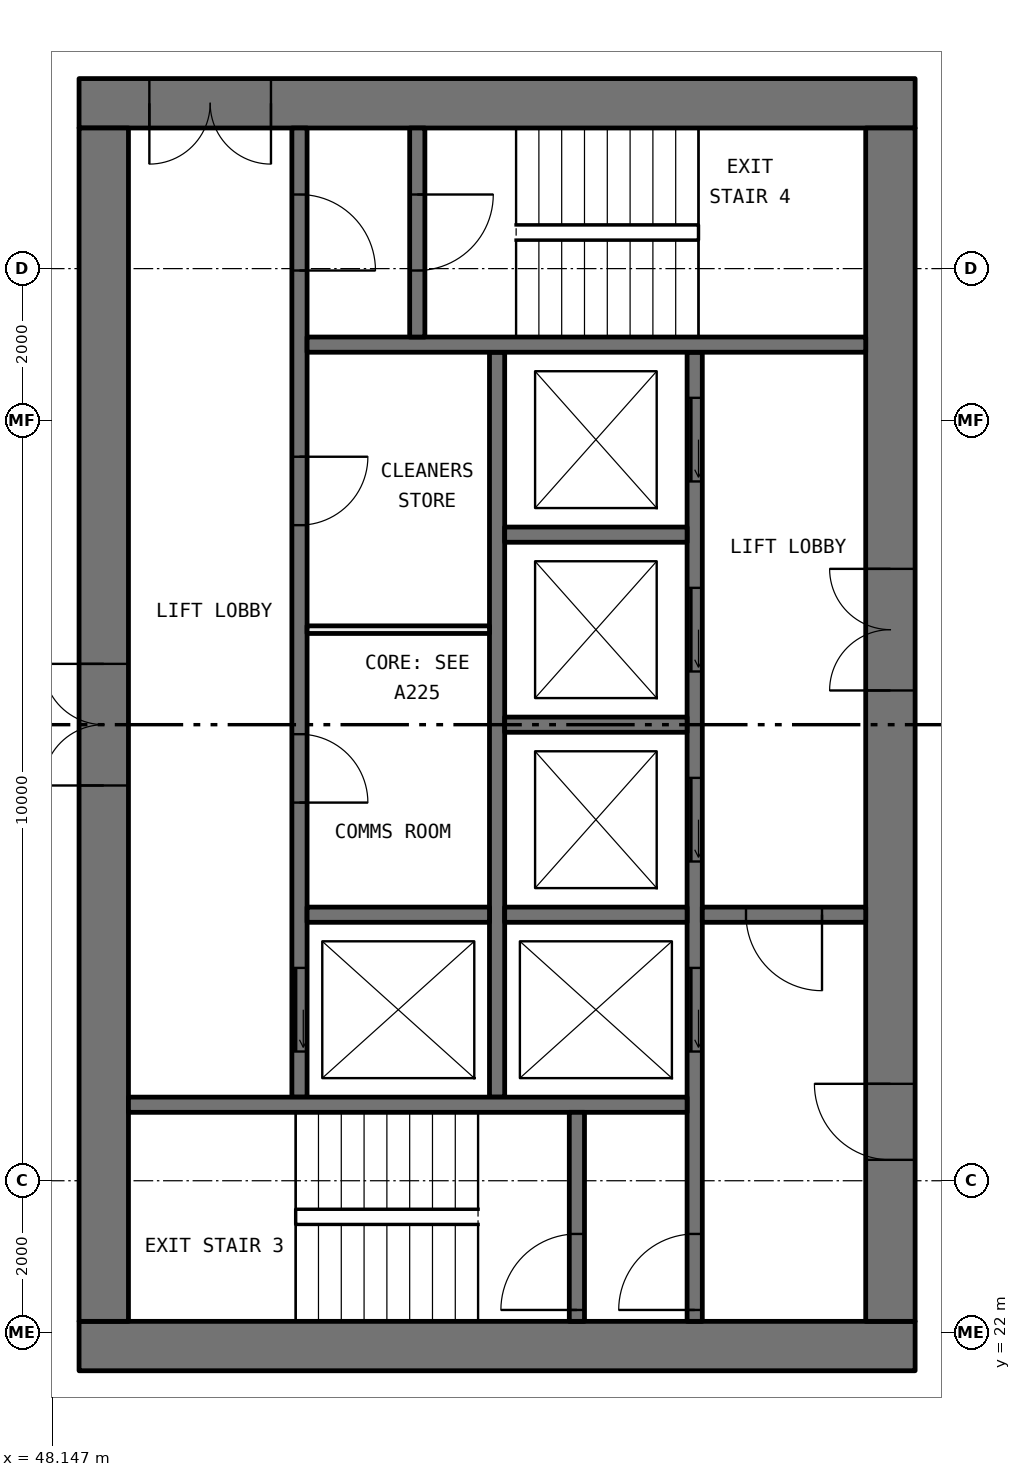
"""IFC4 building model, lengths in metres.
Left out: names, types, materials, properties, quantities, classifications, styles, units other than length and angle.
Written with IfcOpenShell. Run it as: python <this file> out.ifc"""

import sys

from ifc_helpers import new_model, si_unit, direction, frame, frame_2d, origin, place, context, subcontext, project, spatial, rectangle, extrude, element, fill, save


model = new_model("IFC4")
c1 = context("Model", 3, precision=1e-05, world=origin(), true_north=direction((0.0, 1.0)))
c2 = subcontext(c1, "Body", "Model", "MODEL_VIEW")
j1 = project(units=[si_unit("LENGTHUNIT", "METRE"), si_unit("PLANEANGLEUNIT", "RADIAN")], contexts=[c1])
p1 = place(None, origin())
s1 = spatial("IfcSite", under=j1, at=p1, CompositionType="ELEMENT")
p2 = place(p1, origin())
s2 = spatial("IfcBuilding", under=s1, at=p2, CompositionType="ELEMENT")
p3 = place(p2, frame((0.0, 0.0, 96.6)))
s3 = spatial("IfcBuildingStorey", under=s2, at=p3, CompositionType="ELEMENT", Elevation=96.6)
p4 = place(p3, frame((59.5, 21.825, 0.0), z_axis=(0.0, 0.0, 1.0), x_axis=(-1.0, 0.0, 0.0)))
e1 = element("IfcWall", 1, at=p4, inside=s3, PredefinedType="SHEAR", context=c2, shape_type="SweptSolid", body=[
    extrude(rectangle(XDim=11.0, YDim=0.65, at=frame_2d((5.5, 0.0))), origin(), (0.0, 0.0, 1.0), 3.05),
])
p5 = place(p3, frame((59.5, 38.175, 0.0), z_axis=(0.0, 0.0, 1.0), x_axis=(-1.0, 0.0, 0.0)))
e2 = element("IfcWall", 2, at=p5, inside=s3, PredefinedType="SHEAR", context=c2, shape_type="SweptSolid", body=[
    extrude(rectangle(XDim=11.0, YDim=0.65, at=frame_2d((5.5, 0.0))), origin(), (0.0, 0.0, 1.0), 3.05),
])
p6 = place(p5, frame((8.475, 0.0, 0.0)))
e3 = element("IfcOpeningElement", 3, at=p6, cuts=e2, PredefinedType="OPENING", context=c2, shape_type="SweptSolid", body=[
    extrude(rectangle(XDim=1.6, YDim=2.1, at=frame_2d((0.8, 1.05))), frame((0.0, 0.335, 0.0), z_axis=(0.0, -1.0, 0.0), x_axis=(1.0, 0.0, 0.0)), (0.0, 0.0, 1.0), 0.67),
])
p7 = place(p3, frame((59.175, 22.15, 0.0), z_axis=(0.0, 0.0, 1.0), x_axis=(0.0, 1.0, 0.0)))
e4 = element("IfcWall", 4, at=p7, inside=s3, PredefinedType="SHEAR", context=c2, shape_type="SweptSolid", body=[
    extrude(rectangle(XDim=15.7, YDim=0.65, at=frame_2d((7.85, 0.0))), origin(), (0.0, 0.0, 1.0), 3.05),
])
p8 = place(p7, frame((8.3, 0.0, 0.0)))
e5 = element("IfcOpeningElement", 5, at=p8, cuts=e4, PredefinedType="OPENING", context=c2, shape_type="SweptSolid", body=[
    extrude(rectangle(XDim=1.6, YDim=2.1, at=frame_2d((0.8, 1.05))), frame((0.0, 0.335, 0.0), z_axis=(0.0, -1.0, 0.0), x_axis=(1.0, 0.0, 0.0)), (0.0, 0.0, 1.0), 0.67),
])
p9 = place(p7, frame((2.125, 0.0, 0.0)))
e6 = element("IfcOpeningElement", 6, at=p9, cuts=e4, PredefinedType="OPENING", context=c2, shape_type="SweptSolid", body=[
    extrude(rectangle(XDim=1.0, YDim=2.1, at=frame_2d((0.5, 1.05))), frame((0.0, 0.335, 0.0), z_axis=(0.0, -1.0, 0.0), x_axis=(1.0, 0.0, 0.0)), (0.0, 0.0, 1.0), 0.67),
])
p10 = place(p3, frame((48.825, 22.15, 0.0), z_axis=(0.0, 0.0, 1.0), x_axis=(0.0, 1.0, 0.0)))
e7 = element("IfcWall", 7, at=p10, inside=s3, PredefinedType="SHEAR", context=c2, shape_type="SweptSolid", body=[
    extrude(rectangle(XDim=15.7, YDim=0.65, at=frame_2d((7.85, 0.0))), origin(), (0.0, 0.0, 1.0), 3.05),
])
p11 = place(p10, frame((7.05, 0.0, 0.0)))
e8 = element("IfcOpeningElement", 8, at=p11, cuts=e7, PredefinedType="OPENING", context=c2, shape_type="SweptSolid", body=[
    extrude(rectangle(XDim=1.6, YDim=2.1, at=frame_2d((0.8, 1.05))), frame((0.0, 0.335, 0.0), z_axis=(0.0, -1.0, 0.0), x_axis=(1.0, 0.0, 0.0)), (0.0, 0.0, 1.0), 0.67),
])
p12 = place(p3, frame((56.6, 22.15, 0.0), z_axis=(0.0, 0.0, 1.0), x_axis=(0.0, 1.0, 0.0)))
e9 = element("IfcWall", 9, at=p12, inside=s3, PredefinedType="SOLIDWALL", context=c2, shape_type="SweptSolid", body=[
    extrude(rectangle(XDim=12.75, YDim=0.2, at=frame_2d((6.375, 0.0))), origin(), (0.0, 0.0, 1.0), 3.05),
])
p13 = place(p12, frame((3.55, 0.0, 0.0)))
e10 = element("IfcOpeningElement", 10, at=p13, cuts=e9, PredefinedType="OPENING", context=c2, shape_type="SweptSolid", body=[
    extrude(rectangle(XDim=1.1, YDim=2.1, at=frame_2d((0.55, 1.05))), frame((0.0, 0.11, 0.0), z_axis=(0.0, -1.0, 0.0), x_axis=(1.0, 0.0, 0.0)), (0.0, 0.0, 1.0), 0.22),
])
p14 = place(p12, frame((6.05, 0.0, 0.0)))
e11 = element("IfcOpeningElement", 11, at=p14, cuts=e9, PredefinedType="OPENING", context=c2, shape_type="SweptSolid", body=[
    extrude(rectangle(XDim=1.1, YDim=2.1, at=frame_2d((0.55, 1.05))), frame((0.0, 0.11, 0.0), z_axis=(0.0, -1.0, 0.0), x_axis=(1.0, 0.0, 0.0)), (0.0, 0.0, 1.0), 0.22),
])
p15 = place(p12, frame((8.55, 0.0, 0.0)))
e12 = element("IfcOpeningElement", 12, at=p15, cuts=e9, PredefinedType="OPENING", context=c2, shape_type="SweptSolid", body=[
    extrude(rectangle(XDim=1.1, YDim=2.1, at=frame_2d((0.55, 1.05))), frame((0.0, 0.11, 0.0), z_axis=(0.0, -1.0, 0.0), x_axis=(1.0, 0.0, 0.0)), (0.0, 0.0, 1.0), 0.22),
])
p16 = place(p12, frame((11.05, 0.0, 0.0)))
e13 = element("IfcOpeningElement", 13, at=p16, cuts=e9, PredefinedType="OPENING", context=c2, shape_type="SweptSolid", body=[
    extrude(rectangle(XDim=1.1, YDim=2.1, at=frame_2d((0.55, 1.05))), frame((0.0, 0.11, 0.0), z_axis=(0.0, -1.0, 0.0), x_axis=(1.0, 0.0, 0.0)), (0.0, 0.0, 1.0), 0.22),
])
p17 = place(p12, frame((0.15, 0.0, 0.0)))
e14 = element("IfcOpeningElement", 14, at=p17, cuts=e9, PredefinedType="OPENING", context=c2, shape_type="SweptSolid", body=[
    extrude(rectangle(XDim=1.0, YDim=2.1, at=frame_2d((0.5, 1.05))), frame((0.0, 0.11, 0.0), z_axis=(0.0, -1.0, 0.0), x_axis=(1.0, 0.0, 0.0)), (0.0, 0.0, 1.0), 0.22),
])
p18 = place(p3, frame((51.4, 25.1, 0.0), z_axis=(0.0, 0.0, 1.0), x_axis=(0.0, 1.0, 0.0)))
e15 = element("IfcWall", 15, at=p18, inside=s3, PredefinedType="SOLIDWALL", context=c2, shape_type="SweptSolid", body=[
    extrude(rectangle(XDim=12.75, YDim=0.2, at=frame_2d((6.375, 0.0))), origin(), (0.0, 0.0, 1.0), 3.05),
])
p19 = place(p18, frame((0.6, 0.0, 0.0)))
e16 = element("IfcOpeningElement", 16, at=p19, cuts=e15, PredefinedType="OPENING", context=c2, shape_type="SweptSolid", body=[
    extrude(rectangle(XDim=1.1, YDim=2.1, at=frame_2d((0.55, 1.05))), frame((0.0, 0.11, 0.0), z_axis=(0.0, -1.0, 0.0), x_axis=(1.0, 0.0, 0.0)), (0.0, 0.0, 1.0), 0.22),
])
p20 = place(p18, frame((10.875, 0.0, 0.0)))
e17 = element("IfcOpeningElement", 17, at=p20, cuts=e15, PredefinedType="OPENING", context=c2, shape_type="SweptSolid", body=[
    extrude(rectangle(XDim=1.0, YDim=2.1, at=frame_2d((0.5, 1.05))), frame((0.0, 0.11, 0.0), z_axis=(0.0, -1.0, 0.0), x_axis=(1.0, 0.0, 0.0)), (0.0, 0.0, 1.0), 0.22),
])
p21 = place(p18, frame((3.875, 0.0, 0.0)))
e18 = element("IfcOpeningElement", 18, at=p21, cuts=e15, PredefinedType="OPENING", context=c2, shape_type="SweptSolid", body=[
    extrude(rectangle(XDim=0.9, YDim=2.1, at=frame_2d((0.45, 1.05))), frame((0.0, 0.11, 0.0), z_axis=(0.0, -1.0, 0.0), x_axis=(1.0, 0.0, 0.0)), (0.0, 0.0, 1.0), 0.22),
])
p22 = place(p18, frame((7.525, 0.0, 0.0)))
e19 = element("IfcOpeningElement", 19, at=p22, cuts=e15, PredefinedType="OPENING", context=c2, shape_type="SweptSolid", body=[
    extrude(rectangle(XDim=0.9, YDim=2.1, at=frame_2d((0.45, 1.05))), frame((0.0, 0.11, 0.0), z_axis=(0.0, -1.0, 0.0), x_axis=(1.0, 0.0, 0.0)), (0.0, 0.0, 1.0), 0.22),
])
p23 = place(p3, frame((54.0, 25.1, 0.0), z_axis=(0.0, 0.0, 1.0), x_axis=(0.0, 1.0, 0.0)))
e20 = element("IfcWall", 20, at=p23, inside=s3, PredefinedType="SOLIDWALL", context=c2, shape_type="SweptSolid", body=[
    extrude(rectangle(XDim=9.8, YDim=0.2, at=frame_2d((4.9, 0.0))), origin(), (0.0, 0.0, 1.0), 3.05),
])
for number, where, z_axis, x_axis in (
    (21, (56.5, 25.0, 0.0), (0.0, 0.0, 1.0), (-1.0, 0.0, 0.0)),
    (22, (58.85, 35.0, 0.0), (0.0, 0.0, 1.0), (-1.0, 0.0, 0.0)),
):
    element("IfcWall", number, at=place(p3, frame(where, z_axis=z_axis, x_axis=x_axis)), inside=s3, PredefinedType="SOLIDWALL", context=c2, shape_type="SweptSolid", body=[
        extrude(rectangle(XDim=7.35, YDim=0.2, at=frame_2d((3.675, 0.0))), origin(), (0.0, 0.0, 1.0), 3.05),
    ])
p24 = place(p3, frame((58.85, 27.5, 0.0), z_axis=(0.0, 0.0, 1.0), x_axis=(-1.0, 0.0, 0.0)))
e23 = element("IfcWall", 23, at=p24, inside=s3, PredefinedType="SOLIDWALL", context=c2, shape_type="SweptSolid", body=[
    extrude(rectangle(XDim=2.15, YDim=0.2, at=frame_2d((1.075, 0.0))), origin(), (0.0, 0.0, 1.0), 3.05),
])
p25 = place(p24, frame((0.575, 0.0, 0.0)))
e24 = element("IfcOpeningElement", 24, at=p25, cuts=e23, PredefinedType="OPENING", context=c2, shape_type="SweptSolid", body=[
    extrude(rectangle(XDim=1.0, YDim=2.1, at=frame_2d((0.5, 1.05))), frame((0.0, 0.11, 0.0), z_axis=(0.0, -1.0, 0.0), x_axis=(1.0, 0.0, 0.0)), (0.0, 0.0, 1.0), 0.22),
])
p26 = place(p3, frame((55.05, 22.15, 0.0), z_axis=(0.0, 0.0, 1.0), x_axis=(0.0, 1.0, 0.0)))
e25 = element("IfcWall", 25, at=p26, inside=s3, PredefinedType="SOLIDWALL", context=c2, shape_type="SweptSolid", body=[
    extrude(rectangle(XDim=2.75, YDim=0.2, at=frame_2d((1.375, 0.0))), origin(), (0.0, 0.0, 1.0), 3.05),
])
p27 = place(p26, frame((0.15, 0.0, 0.0)))
e26 = element("IfcOpeningElement", 26, at=p27, cuts=e25, PredefinedType="OPENING", context=c2, shape_type="SweptSolid", body=[
    extrude(rectangle(XDim=1.0, YDim=2.1, at=frame_2d((0.5, 1.05))), frame((0.0, 0.11, 0.0), z_axis=(0.0, -1.0, 0.0), x_axis=(1.0, 0.0, 0.0)), (0.0, 0.0, 1.0), 0.22),
])
p28 = place(p3, frame((52.95, 35.1, 0.0), z_axis=(0.0, 0.0, 1.0), x_axis=(0.0, 1.0, 0.0)))
e27 = element("IfcWall", 27, at=p28, inside=s3, PredefinedType="SOLIDWALL", context=c2, shape_type="SweptSolid", body=[
    extrude(rectangle(XDim=2.75, YDim=0.2, at=frame_2d((1.375, 0.0))), origin(), (0.0, 0.0, 1.0), 3.05),
])
p29 = place(p28, frame((0.875, 0.0, 0.0)))
e28 = element("IfcOpeningElement", 28, at=p29, cuts=e27, PredefinedType="OPENING", context=c2, shape_type="SweptSolid", body=[
    extrude(rectangle(XDim=1.0, YDim=2.1, at=frame_2d((0.5, 1.05))), frame((0.0, 0.11, 0.0), z_axis=(0.0, -1.0, 0.0), x_axis=(1.0, 0.0, 0.0)), (0.0, 0.0, 1.0), 0.22),
])
for number, where, z_axis, x_axis in (
    (29, (56.5, 27.5, 0.0), (0.0, 0.0, 1.0), (-1.0, 0.0, 0.0)),
    (30, (56.5, 30.0, 0.0), (0.0, 0.0, 1.0), (-1.0, 0.0, 0.0)),
    (31, (56.5, 32.5, 0.0), (0.0, 0.0, 1.0), (-1.0, 0.0, 0.0)),
    (32, (53.9, 27.5, 0.0), (0.0, 0.0, 1.0), (-1.0, 0.0, 0.0)),
):
    element("IfcWall", number, at=place(p3, frame(where, z_axis=z_axis, x_axis=x_axis)), inside=s3, PredefinedType="SOLIDWALL", context=c2, shape_type="SweptSolid", body=[
        extrude(rectangle(XDim=2.4, YDim=0.2, at=frame_2d((1.2, 0.0))), origin(), (0.0, 0.0, 1.0), 3.05),
    ])
p30 = place(p3, frame((53.9, 31.25, 0.0), z_axis=(0.0, 0.0, 1.0), x_axis=(-1.0, 0.0, 0.0)))
e33 = element("IfcWall", 33, at=p30, inside=s3, PredefinedType="PARTITIONING", context=c2, shape_type="SweptSolid", body=[
    extrude(rectangle(XDim=2.4, YDim=0.1, at=frame_2d((1.2, 0.0))), origin(), (0.0, 0.0, 1.0), 3.05),
])
p31 = place(p19, origin())
e34 = element("IfcDoor", 34, at=p31, inside=s3, OperationType="SLIDING_TO_LEFT", PredefinedType="DOOR", context=c2, shape_type="SweptSolid", body=[
    extrude(rectangle(XDim=1.1, YDim=2.1, at=frame_2d((0.55, 1.05))), frame((0.0, 0.025, 0.0), z_axis=(0.0, -1.0, 0.0), x_axis=(1.0, 0.0, 0.0)), (0.0, 0.0, 1.0), 0.05),
])
fill(e16, e34)
p32 = place(p13, origin())
e35 = element("IfcDoor", 35, at=p32, inside=s3, OperationType="SLIDING_TO_LEFT", PredefinedType="DOOR", context=c2, shape_type="SweptSolid", body=[
    extrude(rectangle(XDim=1.1, YDim=2.1, at=frame_2d((0.55, 1.05))), frame((0.0, 0.025, 0.0), z_axis=(0.0, -1.0, 0.0), x_axis=(1.0, 0.0, 0.0)), (0.0, 0.0, 1.0), 0.05),
])
fill(e10, e35)
p33 = place(p14, origin())
e36 = element("IfcDoor", 36, at=p33, inside=s3, OperationType="SLIDING_TO_LEFT", PredefinedType="DOOR", context=c2, shape_type="SweptSolid", body=[
    extrude(rectangle(XDim=1.1, YDim=2.1, at=frame_2d((0.55, 1.05))), frame((0.0, 0.025, 0.0), z_axis=(0.0, -1.0, 0.0), x_axis=(1.0, 0.0, 0.0)), (0.0, 0.0, 1.0), 0.05),
])
fill(e11, e36)
p34 = place(p15, origin())
e37 = element("IfcDoor", 37, at=p34, inside=s3, OperationType="SLIDING_TO_LEFT", PredefinedType="DOOR", context=c2, shape_type="SweptSolid", body=[
    extrude(rectangle(XDim=1.1, YDim=2.1, at=frame_2d((0.55, 1.05))), frame((0.0, 0.025, 0.0), z_axis=(0.0, -1.0, 0.0), x_axis=(1.0, 0.0, 0.0)), (0.0, 0.0, 1.0), 0.05),
])
fill(e12, e37)
p35 = place(p16, origin())
e38 = element("IfcDoor", 38, at=p35, inside=s3, OperationType="SLIDING_TO_LEFT", PredefinedType="DOOR", context=c2, shape_type="SweptSolid", body=[
    extrude(rectangle(XDim=1.1, YDim=2.1, at=frame_2d((0.55, 1.05))), frame((0.0, 0.025, 0.0), z_axis=(0.0, -1.0, 0.0), x_axis=(1.0, 0.0, 0.0)), (0.0, 0.0, 1.0), 0.05),
])
fill(e13, e38)
p36 = place(p27, origin())
e39 = element("IfcDoor", 39, at=p36, inside=s3, OperationType="SINGLE_SWING_RIGHT", PredefinedType="DOOR", context=c2, shape_type="SweptSolid", body=[
    extrude(rectangle(XDim=1.0, YDim=2.1, at=frame_2d((0.5, 1.05))), frame((0.0, 0.025, 0.0), z_axis=(0.0, -1.0, 0.0), x_axis=(1.0, 0.0, 0.0)), (0.0, 0.0, 1.0), 0.05),
])
fill(e26, e39)
p37 = place(p17, origin())
e40 = element("IfcDoor", 40, at=p37, inside=s3, OperationType="SINGLE_SWING_RIGHT", PredefinedType="DOOR", context=c2, shape_type="SweptSolid", body=[
    extrude(rectangle(XDim=1.0, YDim=2.1, at=frame_2d((0.5, 1.05))), frame((0.0, 0.025, 0.0), z_axis=(0.0, -1.0, 0.0), x_axis=(1.0, 0.0, 0.0)), (0.0, 0.0, 1.0), 0.05),
])
fill(e14, e40)
p38 = place(p20, frame((1.0, 0.0, 0.0), x_axis=(-1.0, 0.0, 0.0)))
e41 = element("IfcDoor", 41, at=p38, inside=s3, OperationType="SINGLE_SWING_LEFT", PredefinedType="DOOR", context=c2, shape_type="SweptSolid", body=[
    extrude(rectangle(XDim=1.0, YDim=2.1, at=frame_2d((0.5, 1.05))), frame((0.0, 0.025, 0.0), z_axis=(0.0, -1.0, 0.0), x_axis=(1.0, 0.0, 0.0)), (0.0, 0.0, 1.0), 0.05),
])
fill(e17, e41)
p39 = place(p29, frame((1.0, 0.0, 0.0), x_axis=(-1.0, 0.0, 0.0)))
e42 = element("IfcDoor", 42, at=p39, inside=s3, OperationType="SINGLE_SWING_RIGHT", PredefinedType="DOOR", context=c2, shape_type="SweptSolid", body=[
    extrude(rectangle(XDim=1.0, YDim=2.1, at=frame_2d((0.5, 1.05))), frame((0.0, 0.025, 0.0), z_axis=(0.0, -1.0, 0.0), x_axis=(1.0, 0.0, 0.0)), (0.0, 0.0, 1.0), 0.05),
])
fill(e28, e42)
p40 = place(p25, origin())
e43 = element("IfcDoor", 43, at=p40, inside=s3, OperationType="SINGLE_SWING_RIGHT", PredefinedType="DOOR", context=c2, shape_type="SweptSolid", body=[
    extrude(rectangle(XDim=1.0, YDim=2.1, at=frame_2d((0.5, 1.05))), frame((0.0, 0.025, 0.0), z_axis=(0.0, -1.0, 0.0), x_axis=(1.0, 0.0, 0.0)), (0.0, 0.0, 1.0), 0.05),
])
fill(e24, e43)
p41 = place(p8, origin())
e44 = element("IfcDoor", 44, at=p41, inside=s3, OperationType="DOUBLE_DOOR_SINGLE_SWING", PredefinedType="DOOR", context=c2, shape_type="SweptSolid", body=[
    extrude(rectangle(XDim=1.6, YDim=2.1, at=frame_2d((0.8, 1.05))), frame((0.0, 0.025, 0.0), z_axis=(0.0, -1.0, 0.0), x_axis=(1.0, 0.0, 0.0)), (0.0, 0.0, 1.0), 0.05),
])
fill(e5, e44)
p42 = place(p9, origin())
e45 = element("IfcDoor", 45, at=p42, inside=s3, OperationType="SINGLE_SWING_LEFT", PredefinedType="DOOR", context=c2, shape_type="SweptSolid", body=[
    extrude(rectangle(XDim=1.0, YDim=2.1, at=frame_2d((0.5, 1.05))), frame((0.0, 0.025, 0.0), z_axis=(0.0, -1.0, 0.0), x_axis=(1.0, 0.0, 0.0)), (0.0, 0.0, 1.0), 0.05),
])
fill(e6, e45)
p43 = place(p6, origin())
e46 = element("IfcDoor", 46, at=p43, inside=s3, OperationType="DOUBLE_DOOR_SINGLE_SWING", PredefinedType="DOOR", context=c2, shape_type="SweptSolid", body=[
    extrude(rectangle(XDim=1.6, YDim=2.1, at=frame_2d((0.8, 1.05))), frame((0.0, 0.025, 0.0), z_axis=(0.0, -1.0, 0.0), x_axis=(1.0, 0.0, 0.0)), (0.0, 0.0, 1.0), 0.05),
])
fill(e3, e46)
p44 = place(p11, origin())
e47 = element("IfcDoor", 47, at=p44, inside=s3, OperationType="DOUBLE_DOOR_SINGLE_SWING", PredefinedType="DOOR", context=c2, shape_type="SweptSolid", body=[
    extrude(rectangle(XDim=1.6, YDim=2.1, at=frame_2d((0.8, 1.05))), frame((0.0, 0.025, 0.0), z_axis=(0.0, -1.0, 0.0), x_axis=(1.0, 0.0, 0.0)), (0.0, 0.0, 1.0), 0.05),
])
fill(e8, e47)
p45 = place(p21, frame((0.9, 0.0, 0.0), x_axis=(-1.0, 0.0, 0.0)))
e48 = element("IfcDoor", 48, at=p45, inside=s3, OperationType="SINGLE_SWING_LEFT", PredefinedType="DOOR", context=c2, shape_type="SweptSolid", body=[
    extrude(rectangle(XDim=0.9, YDim=2.1, at=frame_2d((0.45, 1.05))), frame((0.0, 0.025, 0.0), z_axis=(0.0, -1.0, 0.0), x_axis=(1.0, 0.0, 0.0)), (0.0, 0.0, 1.0), 0.05),
])
fill(e18, e48)
p46 = place(p22, frame((0.9, 0.0, 0.0), x_axis=(-1.0, 0.0, 0.0)))
e49 = element("IfcDoor", 49, at=p46, inside=s3, OperationType="SINGLE_SWING_RIGHT", PredefinedType="DOOR", context=c2, shape_type="SweptSolid", body=[
    extrude(rectangle(XDim=0.9, YDim=2.1, at=frame_2d((0.45, 1.05))), frame((0.0, 0.025, 0.0), z_axis=(0.0, -1.0, 0.0), x_axis=(1.0, 0.0, 0.0)), (0.0, 0.0, 1.0), 0.05),
])
fill(e19, e49)
save(model, sys.argv[1])
